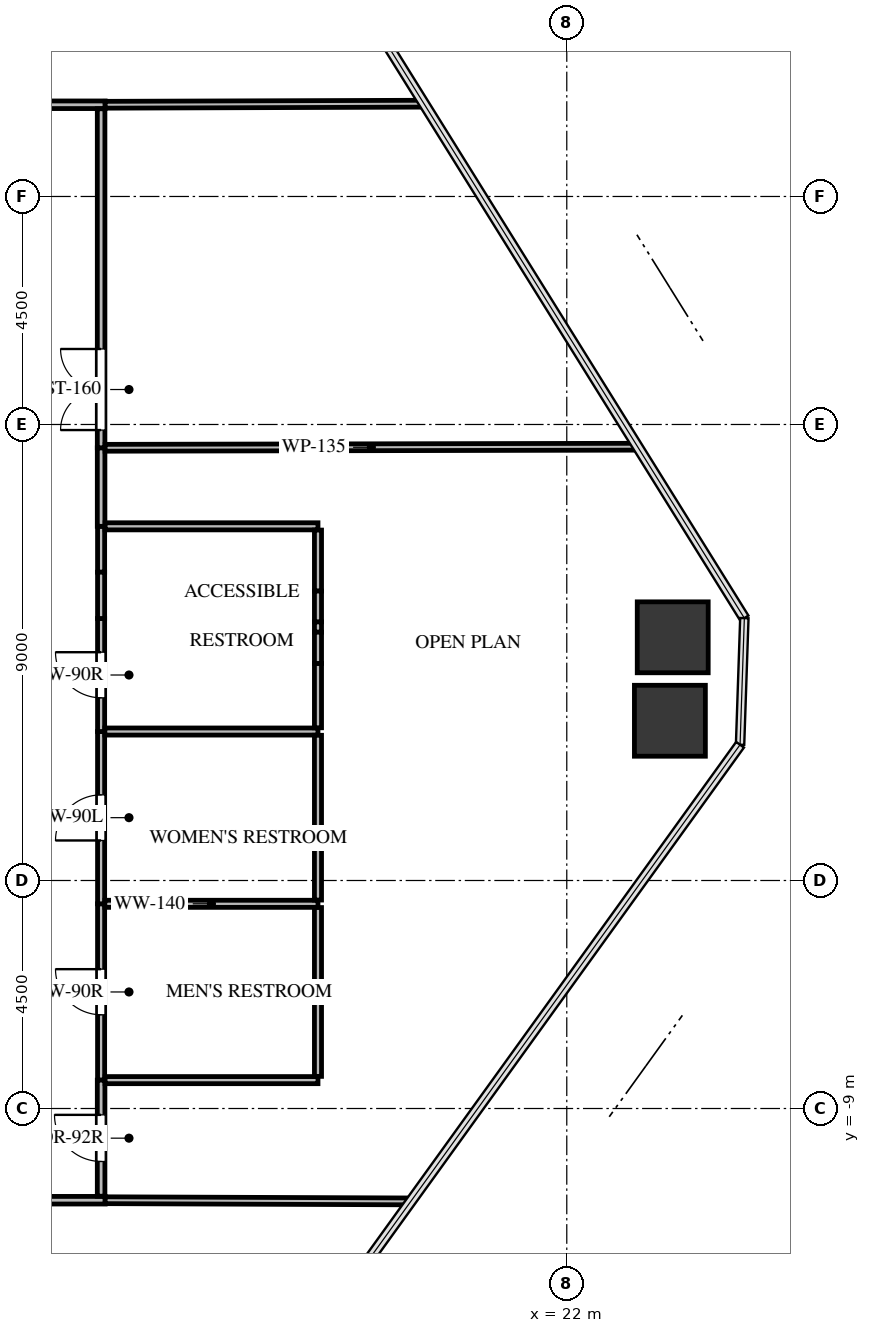
"""IFC4 building model, lengths in metres.
Left out: names, types, materials, properties, quantities, classifications, styles, units other than length and angle.
Written with IfcOpenShell. Run it as: python <this file> out.ifc"""

import sys

from ifc_helpers import new_model, si_unit, direction, frame, frame_2d, origin, origin_2d, place, context, subcontext, project, spatial, rectangle, extrude, source, transform, mapped, element, fill, save


model = new_model("IFC4")
c1 = context("Model", 3, precision=1e-05, world=origin(), true_north=direction((0.0, 1.0)))
c2 = subcontext(c1, "Body", "Model", "MODEL_VIEW")
j1 = project(units=[si_unit("LENGTHUNIT", "METRE"), si_unit("PLANEANGLEUNIT", "RADIAN")], contexts=[c1])
p1 = place(None, origin())
s1 = spatial("IfcSite", under=j1, at=p1, CompositionType="ELEMENT")
p2 = place(p1, origin())
s2 = spatial("IfcBuilding", under=s1, at=p2, CompositionType="ELEMENT")
p3 = place(p2, frame((0.0, 0.0, 68.7)))
s3 = spatial("IfcBuildingStorey", under=s2, at=p3, CompositionType="ELEMENT", Elevation=68.7)
m1 = source(origin(), c2, "Body", "SweptSolid", [
    extrude(rectangle(XDim=1.4, YDim=1.4, at=origin_2d()), origin(), (0.0, 0.0, 1.0), 3.3),
])
for number, where, z_axis, x_axis in (
    (1, (24.091, 0.3, -0.24), (0.0, 0.0, 1.0), (1.0, 0.0, 0.0)),
    (2, (24.035, -1.347, -0.24), (0.0, 0.0, 1.0), (1.0, 0.0, 0.0)),
):
    element("IfcColumn", number, at=place(p3, frame(where, z_axis=z_axis, x_axis=x_axis)), inside=s3, PredefinedType="COLUMN", context=c2, shape_type="MappedRepresentation", body=[
        mapped(m1, transform((0.0, 0.0, 0.0), x_axis=(1.0, 0.0, 0.0), y_axis=(0.0, 1.0, 0.0), z_axis=(0.0, 0.0, 1.0), scale=1.0)),
    ])
p4 = place(p3, frame((12.81, -8.44, 0.0), z_axis=(0.0, 0.0, 1.0), x_axis=(0.0, 1.0, 0.0)))
e3 = element("IfcWall", 3, at=p4, inside=s3, PredefinedType="PARTITIONING", context=c2, shape_type="SweptSolid", body=[
    extrude(rectangle(XDim=3.48, YDim=0.14, at=frame_2d((1.74, 0.0))), origin(), (0.0, 0.0, 1.0), 3.045),
])
p5 = place(p4, frame((1.29, 0.0, 0.0)))
e4 = element("IfcOpeningElement", 4, at=p5, cuts=e3, PredefinedType="OPENING", context=c2, shape_type="SweptSolid", body=[
    extrude(rectangle(XDim=0.9, YDim=2.05, at=frame_2d((0.45, 1.025))), frame((0.0, 0.08, 0.0), z_axis=(0.0, -1.0, 0.0), x_axis=(1.0, 0.0, 0.0)), (0.0, 0.0, 1.0), 0.16),
])
p6 = place(p3, frame((12.81, -4.96, 0.0), z_axis=(0.0, 0.0, 1.0), x_axis=(0.0, 1.0, 0.0)))
e5 = element("IfcWall", 5, at=p6, inside=s3, PredefinedType="PARTITIONING", context=c2, shape_type="SweptSolid", body=[
    extrude(rectangle(XDim=3.4, YDim=0.14, at=frame_2d((1.7, 0.0))), origin(), (0.0, 0.0, 1.0), 3.045),
])
p7 = place(p6, frame((1.25, 0.0, 0.0)))
e6 = element("IfcOpeningElement", 6, at=p7, cuts=e5, PredefinedType="OPENING", context=c2, shape_type="SweptSolid", body=[
    extrude(rectangle(XDim=0.9, YDim=2.05, at=frame_2d((0.45, 1.025))), frame((0.0, 0.08, 0.0), z_axis=(0.0, -1.0, 0.0), x_axis=(1.0, 0.0, 0.0)), (0.0, 0.0, 1.0), 0.16),
])
p8 = place(p3, frame((12.81, -1.56, 0.0), z_axis=(0.0, 0.0, 1.0), x_axis=(0.0, 1.0, 0.0)))
e7 = element("IfcWall", 7, at=p8, inside=s3, PredefinedType="PARTITIONING", context=c2, shape_type="SweptSolid", body=[
    extrude(rectangle(XDim=2.231, YDim=0.14, at=frame_2d((1.116, 0.0))), origin(), (0.0, 0.0, 1.0), 3.045),
])
p9 = place(p8, frame((0.666, 0.0, 0.0)))
e8 = element("IfcOpeningElement", 8, at=p9, cuts=e7, PredefinedType="OPENING", context=c2, shape_type="SweptSolid", body=[
    extrude(rectangle(XDim=0.9, YDim=2.05, at=frame_2d((0.45, 1.025))), frame((0.0, 0.08, 0.0), z_axis=(0.0, -1.0, 0.0), x_axis=(1.0, 0.0, 0.0)), (0.0, 0.0, 1.0), 0.16),
])
p10 = place(p3, frame((12.81, 1.585, 0.0), z_axis=(0.0, 0.0, 1.0), x_axis=(0.0, 1.0, 0.0)))
e9 = element("IfcWall", 9, at=p10, inside=s3, PredefinedType="PARTITIONING", context=c2, shape_type="SweptSolid", body=[
    extrude(rectangle(XDim=0.905, YDim=0.14, at=frame_2d((0.453, 0.0))), origin(), (0.0, 0.0, 1.0), 3.045),
])
p11 = place(p3, frame((12.81, 0.671, 0.0), z_axis=(0.0, 0.0, 1.0), x_axis=(0.0, 1.0, 0.0)))
e10 = element("IfcWall", 10, at=p11, inside=s3, PredefinedType="PARTITIONING", context=c2, shape_type="SweptSolid", body=[
    extrude(rectangle(XDim=0.914, YDim=0.14, at=frame_2d((0.457, 0.0))), origin(), (0.0, 0.0, 1.0), 2.13),
])
p12 = place(p3, frame((12.89, 10.81, 0.0), z_axis=(0.0, 0.0, 1.0), x_axis=(-1.0, 0.0, 0.0)))
e11 = element("IfcWall", 11, at=p12, inside=s3, PredefinedType="PARTITIONING", context=c2, shape_type="SweptSolid", body=[
    extrude(rectangle(XDim=1.847, YDim=0.15, at=frame_2d((0.924, 0.0))), origin(), (0.0, 0.0, 1.0), 3.045),
])
p13 = place(p3, frame((6.04, -10.81, 0.0), z_axis=(0.0, 0.0, 1.0), x_axis=(1.0, 0.0, 0.0)))
e12 = element("IfcWall", 12, at=p13, inside=s3, PredefinedType="PARTITIONING", context=c2, shape_type="SweptSolid", body=[
    extrude(rectangle(XDim=6.85, YDim=0.15, at=frame_2d((3.425, 0.0))), origin(), (0.0, 0.0, 1.0), 3.045),
])
p14 = place(p13, frame((2.965, 0.0, 0.0)))
e13 = element("IfcOpeningElement", 13, at=p14, cuts=e12, PredefinedType="OPENING", context=c2, shape_type="SweptSolid", body=[
    extrude(rectangle(XDim=0.92, YDim=2.1, at=frame_2d((0.46, 1.05))), frame((0.0, 0.085, 0.0), z_axis=(0.0, -1.0, 0.0), x_axis=(1.0, 0.0, 0.0)), (0.0, 0.0, 1.0), 0.17),
])
p15 = place(p3, frame((12.81, -10.731, 0.0), z_axis=(0.0, 0.0, 1.0), x_axis=(0.0, 1.0, 0.0)))
e14 = element("IfcWall", 14, at=p15, inside=s3, PredefinedType="PARTITIONING", context=c2, shape_type="SweptSolid", body=[
    extrude(rectangle(XDim=2.291, YDim=0.15, at=frame_2d((1.146, 0.0))), origin(), (0.0, 0.0, 1.0), 3.045),
])
p16 = place(p15, frame((0.686, 0.0, 0.0)))
e15 = element("IfcOpeningElement", 15, at=p16, cuts=e14, PredefinedType="OPENING", context=c2, shape_type="SweptSolid", body=[
    extrude(rectangle(XDim=0.92, YDim=2.1, at=frame_2d((0.46, 1.05))), frame((0.0, 0.085, 0.0), z_axis=(0.0, -1.0, 0.0), x_axis=(1.0, 0.0, 0.0)), (0.0, 0.0, 1.0), 0.17),
])
p17 = place(p3, frame((12.81, 2.49, 0.0), z_axis=(0.0, 0.0, 1.0), x_axis=(0.0, 1.0, 0.0)))
e16 = element("IfcWall", 16, at=p17, inside=s3, PredefinedType="PARTITIONING", context=c2, shape_type="SweptSolid", body=[
    extrude(rectangle(XDim=1.55, YDim=0.15, at=frame_2d((0.775, 0.0))), origin(), (0.0, 0.0, 1.0), 3.045),
])
p18 = place(p3, frame((12.81, 4.04, 0.0), z_axis=(0.0, 0.0, 1.0), x_axis=(0.0, 1.0, 0.0)))
e17 = element("IfcWall", 17, at=p18, inside=s3, PredefinedType="PARTITIONING", context=c2, shape_type="SweptSolid", body=[
    extrude(rectangle(XDim=6.691, YDim=0.15, at=frame_2d((3.345, 0.0))), origin(), (0.0, 0.0, 1.0), 3.045),
])
p19 = place(p18, frame((0.35, 0.0, 0.0)))
e18 = element("IfcOpeningElement", 18, at=p19, cuts=e17, PredefinedType="OPENING", context=c2, shape_type="SweptSolid", body=[
    extrude(rectangle(XDim=1.6, YDim=2.15, at=frame_2d((0.8, 1.075))), frame((0.0, 0.085, 0.0), z_axis=(0.0, -1.0, 0.0), x_axis=(1.0, 0.0, 0.0)), (0.0, 0.0, 1.0), 0.17),
])
p20 = place(p3, frame((12.884, -4.96, 0.0), z_axis=(0.0, 0.0, 1.0), x_axis=(1.0, 0.0, 0.0)))
e19 = element("IfcWall", 19, at=p20, inside=s3, PredefinedType="PARTITIONING", context=c2, shape_type="SweptSolid", body=[
    extrude(rectangle(XDim=4.206, YDim=0.14, at=frame_2d((2.103, 0.0))), origin(), (0.0, 0.0, 1.0), 3.045),
])
p21 = place(p3, frame((17.09, -8.44, 0.0), z_axis=(0.0, 0.0, 1.0), x_axis=(-1.0, 0.0, 0.0)))
e20 = element("IfcWall", 20, at=p21, inside=s3, PredefinedType="PARTITIONING", context=c2, shape_type="SweptSolid", body=[
    extrude(rectangle(XDim=4.201, YDim=0.14, at=frame_2d((2.101, 0.0))), origin(), (0.0, 0.0, 1.0), 3.045),
])
p22 = place(p3, frame((17.09, -5.034, 0.0), z_axis=(0.0, 0.0, 1.0), x_axis=(0.0, -1.0, 0.0)))
e21 = element("IfcWall", 21, at=p22, inside=s3, PredefinedType="PARTITIONING", context=c2, shape_type="SweptSolid", body=[
    extrude(rectangle(XDim=3.332, YDim=0.14, at=frame_2d((1.666, 0.0))), origin(), (0.0, 0.0, 1.0), 3.045),
])
p23 = place(p3, frame((12.884, -1.56, 0.0), z_axis=(0.0, 0.0, 1.0), x_axis=(1.0, 0.0, 0.0)))
e22 = element("IfcWall", 22, at=p23, inside=s3, PredefinedType="PARTITIONING", context=c2, shape_type="SweptSolid", body=[
    extrude(rectangle(XDim=4.206, YDim=0.14, at=frame_2d((2.103, 0.0))), origin(), (0.0, 0.0, 1.0), 3.045),
])
p24 = place(p3, frame((17.09, -1.634, 0.0), z_axis=(0.0, 0.0, 1.0), x_axis=(0.0, -1.0, 0.0)))
e23 = element("IfcWall", 23, at=p24, inside=s3, PredefinedType="PARTITIONING", context=c2, shape_type="SweptSolid", body=[
    extrude(rectangle(XDim=3.252, YDim=0.14, at=frame_2d((1.626, 0.0))), origin(), (0.0, 0.0, 1.0), 3.045),
])
p25 = place(p3, frame((12.889, 2.49, 0.0), z_axis=(0.0, 0.0, 1.0), x_axis=(1.0, 0.0, 0.0)))
e24 = element("IfcWall", 24, at=p25, inside=s3, PredefinedType="PARTITIONING", context=c2, shape_type="SweptSolid", body=[
    extrude(rectangle(XDim=4.201, YDim=0.14, at=frame_2d((2.101, 0.0))), origin(), (0.0, 0.0, 1.0), 3.045),
])
p26 = place(p3, frame((17.09, 2.416, 0.0), z_axis=(0.0, 0.0, 1.0), x_axis=(0.0, -1.0, 0.0)))
e25 = element("IfcWall", 25, at=p26, inside=s3, PredefinedType="PARTITIONING", context=c2, shape_type="SweptSolid", body=[
    extrude(rectangle(XDim=1.204, YDim=0.14, at=frame_2d((0.602, 0.0))), origin(), (0.0, 0.0, 1.0), 3.045),
])
p27 = place(p3, frame((17.09, 0.606, 0.0), z_axis=(0.0, 0.0, 1.0), x_axis=(0.0, -1.0, 0.0)))
e26 = element("IfcWall", 26, at=p27, inside=s3, PredefinedType="PARTITIONING", context=c2, shape_type="SweptSolid", body=[
    extrude(rectangle(XDim=0.205, YDim=0.14, at=frame_2d((0.103, 0.0))), origin(), (0.0, 0.0, 1.0), 3.045),
])
p28 = place(p3, frame((17.09, -0.216, 0.0), z_axis=(0.0, 0.0, 1.0), x_axis=(0.0, -1.0, 0.0)))
e27 = element("IfcWall", 27, at=p28, inside=s3, PredefinedType="PARTITIONING", context=c2, shape_type="SweptSolid", body=[
    extrude(rectangle(XDim=1.27, YDim=0.14, at=frame_2d((0.635, 0.0))), origin(), (0.0, 0.0, 1.0), 3.045),
])
p29 = place(p3, frame((17.09, 1.212, 0.0), z_axis=(0.0, 0.0, 1.0), x_axis=(0.0, -1.0, 0.0)))
e28 = element("IfcWall", 28, at=p29, inside=s3, PredefinedType="PARTITIONING", context=c2, shape_type="SweptSolid", body=[
    extrude(rectangle(XDim=0.606, YDim=0.14, at=frame_2d((0.303, 0.0))), origin(), (0.0, 0.0, 1.0), 2.13),
])
p30 = place(p3, frame((17.09, 0.401, 0.0), z_axis=(0.0, 0.0, 1.0), x_axis=(0.0, -1.0, 0.0)))
e29 = element("IfcWall", 29, at=p30, inside=s3, PredefinedType="PARTITIONING", context=c2, shape_type="SweptSolid", body=[
    extrude(rectangle(XDim=0.617, YDim=0.14, at=frame_2d((0.309, 0.0))), origin(), (0.0, 0.0, 1.0), 2.13),
])
p31 = place(p3, frame((19.182, 10.831, 0.0), z_axis=(0.0, 0.0, 1.0), x_axis=(-0.999994432845, -0.003336806783, 0.0)))
e30 = element("IfcWall", 30, at=p31, inside=s3, PredefinedType="PARTITIONING", context=c2, shape_type="SweptSolid", body=[
    extrude(rectangle(XDim=6.292, YDim=0.135, at=frame_2d((3.146, 0.0))), origin(), (0.0, 0.0, 1.0), 2.38),
])
p32 = place(p3, frame((12.89, -10.81, 0.0), z_axis=(0.0, 0.0, 1.0), x_axis=(0.999992607823, -0.003845035728, 0.0)))
e31 = element("IfcWall", 31, at=p32, inside=s3, PredefinedType="PARTITIONING", context=c2, shape_type="SweptSolid", body=[
    extrude(rectangle(XDim=6.032, YDim=0.135, at=frame_2d((3.016, 0.0))), origin(), (0.0, 0.0, 1.0), 2.38),
])
p33 = place(p3, frame((12.889, 4.04, 0.0), z_axis=(0.0, 0.0, 1.0), x_axis=(0.999998004093, 0.001997951593, 0.0)))
e32 = element("IfcWall", 32, at=p33, inside=s3, PredefinedType="PARTITIONING", context=c2, shape_type="SweptSolid", body=[
    extrude(rectangle(XDim=10.509, YDim=0.135, at=frame_2d((5.254, 0.0))), origin(), (0.0, 0.0, 1.0), 2.38),
])
m2 = source(origin(), c2, "Body", "SweptSolid", [
    extrude(rectangle(XDim=0.9, YDim=2.05, at=frame_2d((0.45, 1.025))), frame((0.0, 0.025, 0.0), z_axis=(0.0, -1.0, 0.0), x_axis=(1.0, 0.0, 0.0)), (0.0, 0.0, 1.0), 0.05),
])
p34 = place(p5, origin())
e33 = element("IfcDoor", 33, at=p34, inside=s3, OperationType="SINGLE_SWING_RIGHT", PredefinedType="DOOR", context=c2, shape_type="MappedRepresentation", body=[
    mapped(m2, transform((0.0, 0.0, 0.0), x_axis=(1.0, 0.0, 0.0), y_axis=(0.0, 1.0, 0.0), z_axis=(0.0, 0.0, 1.0), scale=1.0)),
])
fill(e4, e33)
m3 = source(origin(), c2, "Body", "SweptSolid", [
    extrude(rectangle(XDim=0.9, YDim=2.05, at=frame_2d((0.45, 1.025))), frame((0.0, 0.025, 0.0), z_axis=(0.0, -1.0, 0.0), x_axis=(1.0, 0.0, 0.0)), (0.0, 0.0, 1.0), 0.05),
])
p35 = place(p7, origin())
e34 = element("IfcDoor", 34, at=p35, inside=s3, OperationType="SINGLE_SWING_LEFT", PredefinedType="DOOR", context=c2, shape_type="MappedRepresentation", body=[
    mapped(m3, transform((0.0, 0.0, 0.0), x_axis=(1.0, 0.0, 0.0), y_axis=(0.0, 1.0, 0.0), z_axis=(0.0, 0.0, 1.0), scale=1.0)),
])
fill(e6, e34)
p36 = place(p9, origin())
e35 = element("IfcDoor", 35, at=p36, inside=s3, OperationType="SINGLE_SWING_RIGHT", PredefinedType="DOOR", context=c2, shape_type="MappedRepresentation", body=[
    mapped(m2, transform((0.0, 0.0, 0.0), x_axis=(1.0, 0.0, 0.0), y_axis=(0.0, 1.0, 0.0), z_axis=(0.0, 0.0, 1.0), scale=1.0)),
])
fill(e8, e35)
m4 = source(origin(), c2, "Body", "SweptSolid", [
    extrude(rectangle(XDim=0.92, YDim=2.1, at=frame_2d((0.46, 1.05))), frame((0.0, 0.025, 0.0), z_axis=(0.0, -1.0, 0.0), x_axis=(1.0, 0.0, 0.0)), (0.0, 0.0, 1.0), 0.05),
])
p37 = place(p16, origin())
e36 = element("IfcDoor", 36, at=p37, inside=s3, OperationType="SINGLE_SWING_RIGHT", PredefinedType="DOOR", context=c2, shape_type="MappedRepresentation", body=[
    mapped(m4, transform((0.0, 0.0, 0.0), x_axis=(1.0, 0.0, 0.0), y_axis=(0.0, 1.0, 0.0), z_axis=(0.0, 0.0, 1.0), scale=1.0)),
])
fill(e15, e36)
m5 = source(origin(), c2, "Body", "SweptSolid", [
    extrude(rectangle(XDim=1.6, YDim=2.15, at=frame_2d((0.8, 1.075))), frame((0.0, 0.025, 0.0), z_axis=(0.0, -1.0, 0.0), x_axis=(1.0, 0.0, 0.0)), (0.0, 0.0, 1.0), 0.05),
])
p38 = place(p19, origin())
e37 = element("IfcDoor", 37, at=p38, inside=s3, OperationType="DOUBLE_DOOR_SINGLE_SWING", PredefinedType="DOOR", context=c2, shape_type="MappedRepresentation", body=[
    mapped(m5, transform((0.0, 0.0, 0.0), x_axis=(1.0, 0.0, 0.0), y_axis=(0.0, 1.0, 0.0), z_axis=(0.0, 0.0, 1.0), scale=1.0)),
])
fill(e18, e37)
save(model, sys.argv[1])
